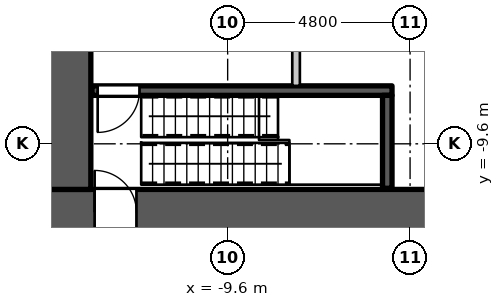
"""IFC4 building model, lengths in metres.
Left out: names, types, materials, properties, quantities, classifications, styles, units other than length and angle.
Written with IfcOpenShell. Run it as: python <this file> out.ifc"""

import sys

from ifc_helpers import new_model, si_unit, direction, frame, frame_2d, origin, place, context, subcontext, project, spatial, rectangle, extrude, element, fill, save


model = new_model("IFC4")
c1 = context("Model", 3, precision=1e-05, world=origin(), true_north=direction((0.0, 1.0)))
c2 = subcontext(c1, "Body", "Model", "MODEL_VIEW")
j1 = project(units=[si_unit("LENGTHUNIT", "METRE"), si_unit("PLANEANGLEUNIT", "RADIAN")], contexts=[c1])
p1 = place(None, origin())
s1 = spatial("IfcSite", under=j1, at=p1, CompositionType="ELEMENT")
p2 = place(p1, origin())
s2 = spatial("IfcBuilding", under=s1, at=p2, CompositionType="ELEMENT")
p3 = place(p2, frame((0.0, 0.0, -9.0)))
s3 = spatial("IfcBuildingStorey", under=s2, at=p3, CompositionType="ELEMENT", Elevation=-9.0)
p4 = place(p3, frame((-14.4, -11.4, 0.0), z_axis=(0.0, 0.0, 1.0), x_axis=(1.0, 0.0, 0.0)))
e1 = element("IfcWall", 1, at=p4, inside=s3, PredefinedType="SHEAR", context=c2, shape_type="SweptSolid", body=[
    extrude(rectangle(XDim=28.8, YDim=1.2, at=frame_2d((14.4, 0.0))), origin(), (0.0, 0.0, 1.0), 4.5),
])
p5 = place(p4, frame((1.3, 0.0, 0.0)))
e2 = element("IfcOpeningElement", 2, at=p5, cuts=e1, PredefinedType="OPENING", context=c2, shape_type="SweptSolid", body=[
    extrude(rectangle(XDim=1.1, YDim=2.2, at=frame_2d((0.55, 1.1))), frame((0.0, 0.61, 0.0), z_axis=(0.0, -1.0, 0.0), x_axis=(1.0, 0.0, 0.0)), (0.0, 0.0, 1.0), 1.22),
])
p6 = place(p4, frame((26.4, 0.0, 0.0)))
e3 = element("IfcOpeningElement", 3, at=p6, cuts=e1, PredefinedType="OPENING", context=c2, shape_type="SweptSolid", body=[
    extrude(rectangle(XDim=1.1, YDim=2.2, at=frame_2d((0.55, 1.1))), frame((0.0, 0.61, 0.0), z_axis=(0.0, -1.0, 0.0), x_axis=(1.0, 0.0, 0.0)), (0.0, 0.0, 1.0), 1.22),
])
p7 = place(p3, frame((-13.8, -10.8, 0.0), z_axis=(0.0, 0.0, 1.0), x_axis=(0.0, 1.0, 0.0)))
e4 = element("IfcWall", 4, at=p7, inside=s3, PredefinedType="SHEAR", context=c2, shape_type="SweptSolid", body=[
    extrude(rectangle(XDim=21.6, YDim=1.2, at=frame_2d((10.8, 0.0))), origin(), (0.0, 0.0, 1.0), 4.5),
])
p8 = place(p7, frame((15.5, 0.0, 0.0)))
e5 = element("IfcOpeningElement", 5, at=p8, cuts=e4, PredefinedType="OPENING", context=c2, shape_type="SweptSolid", body=[
    extrude(rectangle(XDim=1.5, YDim=2.4, at=frame_2d((0.75, 1.2))), frame((0.0, 0.61, 0.0), z_axis=(0.0, -1.0, 0.0), x_axis=(1.0, 0.0, 0.0)), (0.0, 0.0, 1.0), 1.22),
])
p9 = place(p7, frame((4.5, 0.0, 0.0)))
e6 = element("IfcOpeningElement", 6, at=p9, cuts=e4, PredefinedType="OPENING", context=c2, shape_type="SweptSolid", body=[
    extrude(rectangle(XDim=1.5, YDim=2.4, at=frame_2d((0.75, 1.2))), frame((0.0, 0.61, 0.0), z_axis=(0.0, -1.0, 0.0), x_axis=(1.0, 0.0, 0.0)), (0.0, 0.0, 1.0), 1.22),
])
p10 = place(p3, frame((-7.8, -8.075, 0.0), z_axis=(0.0, 0.0, 1.0), x_axis=(0.0, 1.0, 0.0)))
e7 = element("IfcWall", 7, at=p10, inside=s3, PredefinedType="PARTITIONING", context=c2, shape_type="SweptSolid", body=[
    extrude(rectangle(XDim=5.275, YDim=0.2, at=frame_2d((2.637, 0.0))), origin(), (0.0, 0.0, 1.0), 4.048),
])
p11 = place(p10, frame((3.0, 0.0, 0.0)))
e8 = element("IfcOpeningElement", 8, at=p11, cuts=e7, PredefinedType="OPENING", context=c2, shape_type="SweptSolid", body=[
    extrude(rectangle(XDim=1.5, YDim=2.4, at=frame_2d((0.75, 1.2))), frame((0.0, 0.11, 0.0), z_axis=(0.0, -1.0, 0.0), x_axis=(1.0, 0.0, 0.0)), (0.0, 0.0, 1.0), 0.22),
])
p12 = place(p3, frame((-13.17, -8.2, 0.0), z_axis=(0.0, 0.0, 1.0), x_axis=(1.0, 0.0, 0.0)))
e9 = element("IfcWall", 9, at=p12, inside=s3, PredefinedType="SHEAR", context=c2, shape_type="SweptSolid", body=[
    extrude(rectangle(XDim=7.895, YDim=0.25, at=frame_2d((3.948, 0.0))), origin(), (0.0, 0.0, 1.0), 4.048),
])
p13 = place(p12, frame((0.15, 0.0, 0.0)))
e10 = element("IfcOpeningElement", 10, at=p13, cuts=e9, PredefinedType="OPENING", context=c2, shape_type="SweptSolid", body=[
    extrude(rectangle(XDim=1.1, YDim=2.2, at=frame_2d((0.55, 1.1))), frame((0.0, 0.135, 0.0), z_axis=(0.0, -1.0, 0.0), x_axis=(1.0, 0.0, 0.0)), (0.0, 0.0, 1.0), 0.27),
])
p14 = place(p3, frame((-5.4, -10.77, 0.0), z_axis=(0.0, 0.0, 1.0), x_axis=(0.0, 1.0, 0.0)))
e11 = element("IfcWall", 11, at=p14, inside=s3, PredefinedType="SHEAR", context=c2, shape_type="SweptSolid", body=[
    extrude(rectangle(XDim=2.445, YDim=0.25, at=frame_2d((1.223, 0.0))), origin(), (0.0, 0.0, 1.0), 4.048),
])
p15 = place(p13, origin())
e12 = element("IfcDoor", 12, at=p15, inside=s3, OperationType="SINGLE_SWING_RIGHT", PredefinedType="DOOR", context=c2, shape_type="SweptSolid", body=[
    extrude(rectangle(XDim=1.1, YDim=2.2, at=frame_2d((0.55, 1.1))), frame((0.0, 0.025, 0.0), z_axis=(0.0, -1.0, 0.0), x_axis=(1.0, 0.0, 0.0)), (0.0, 0.0, 1.0), 0.05),
])
fill(e10, e12)
p16 = place(p5, origin())
e13 = element("IfcDoor", 13, at=p16, inside=s3, OperationType="SINGLE_SWING_LEFT", PredefinedType="DOOR", context=c2, shape_type="SweptSolid", body=[
    extrude(rectangle(XDim=1.1, YDim=2.2, at=frame_2d((0.55, 1.1))), frame((0.0, 0.025, 0.0), z_axis=(0.0, -1.0, 0.0), x_axis=(1.0, 0.0, 0.0)), (0.0, 0.0, 1.0), 0.05),
])
fill(e2, e13)
save(model, sys.argv[1])
